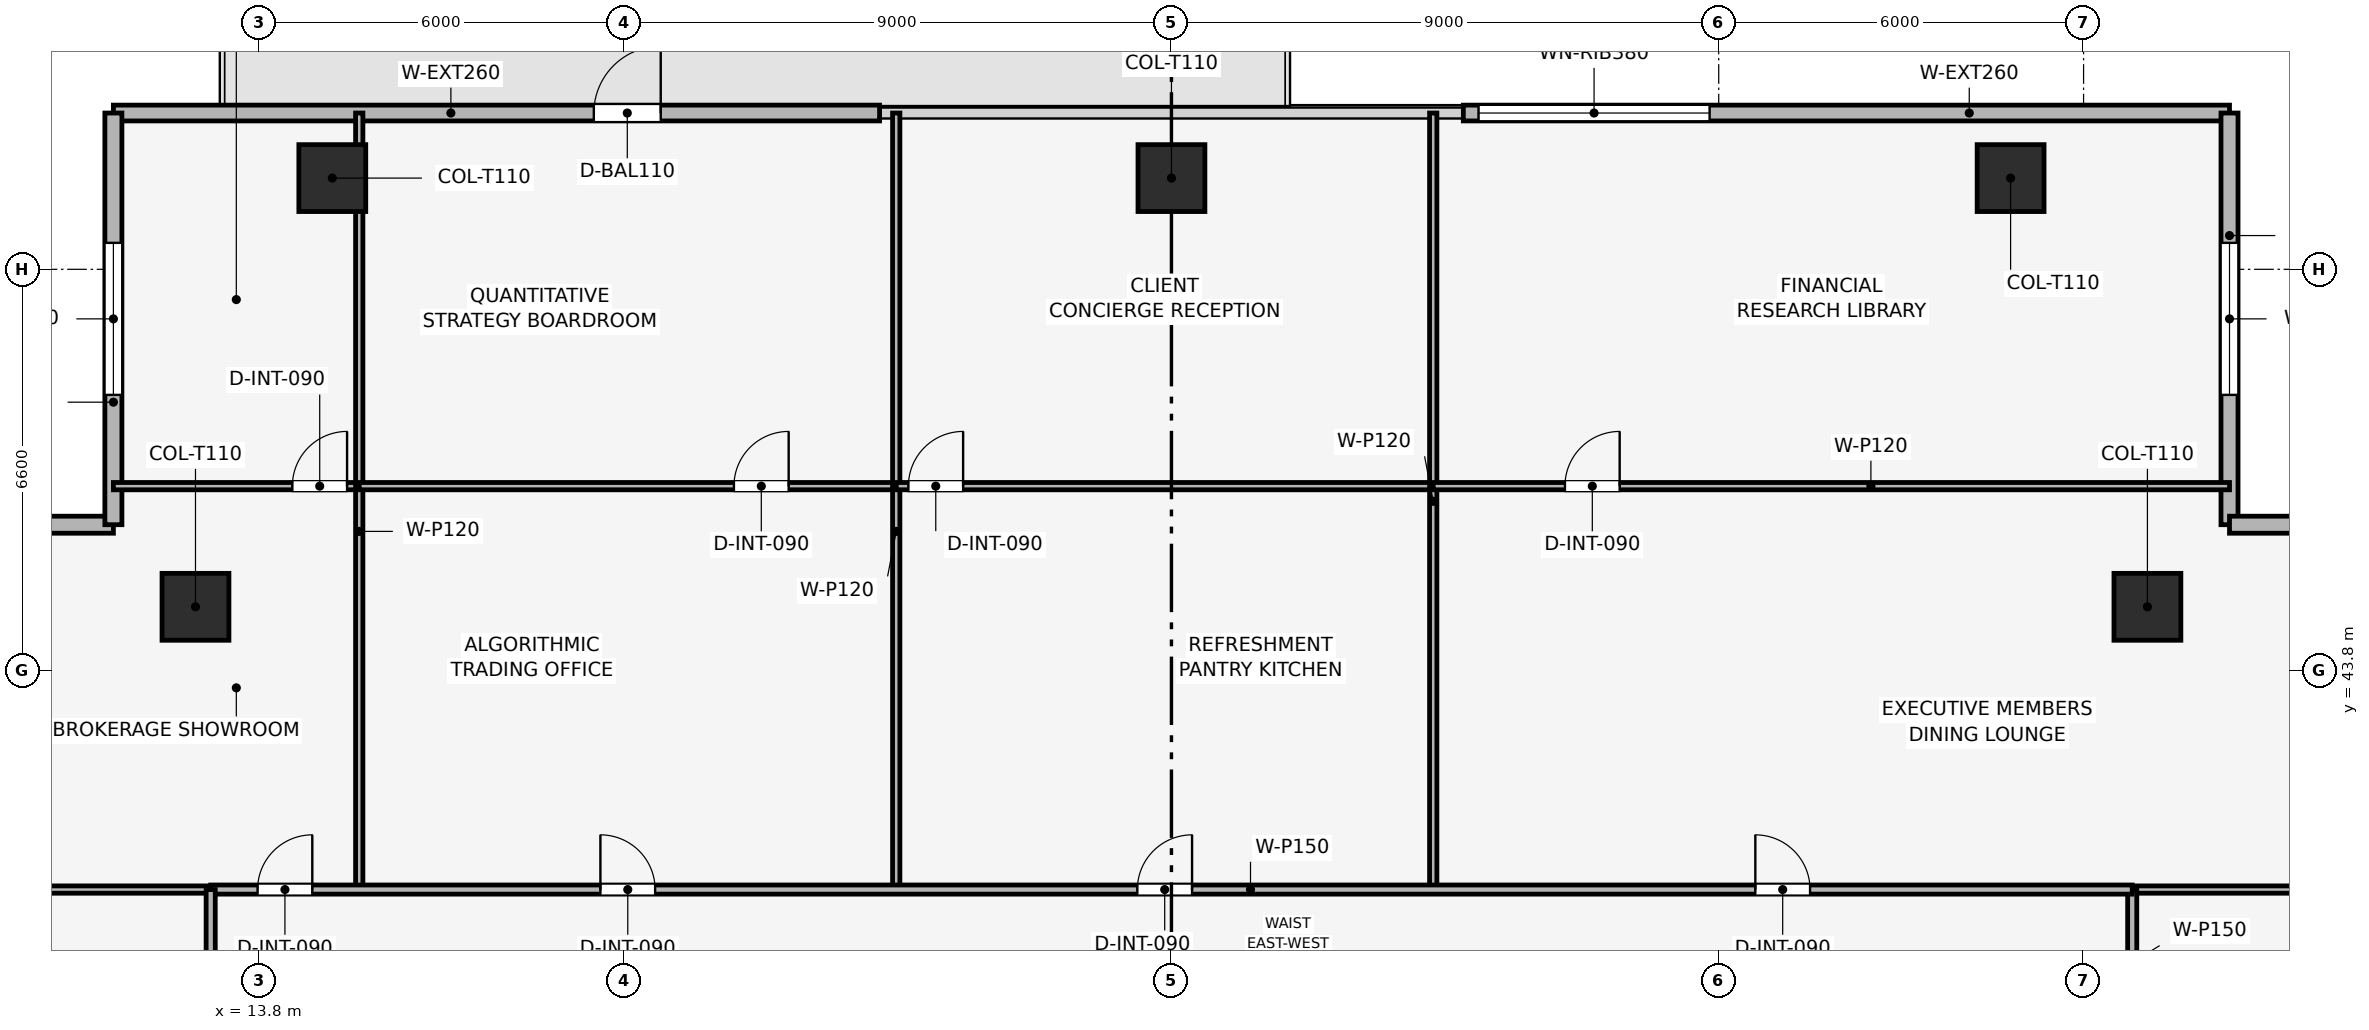
"""IFC4 building model, lengths in metres.
Left out: names, types, materials, properties, quantities, classifications, styles, units other than length and angle.
Written with IfcOpenShell. Run it as: python <this file> out.ifc"""

import sys

from ifc_helpers import new_model, si_unit, direction, frame, frame_2d, origin, origin_2d, place, context, subcontext, project, spatial, rectangle, extrude, element, fill, save


model = new_model("IFC4")
c1 = context("Model", 3, precision=1e-05, world=origin(), true_north=direction((0.0, 1.0)))
c2 = subcontext(c1, "Body", "Model", "MODEL_VIEW")
j1 = project(units=[si_unit("LENGTHUNIT", "METRE"), si_unit("PLANEANGLEUNIT", "RADIAN")], contexts=[c1])
p1 = place(None, origin())
s1 = spatial("IfcSite", under=j1, at=p1, CompositionType="ELEMENT")
p2 = place(p1, origin())
s2 = spatial("IfcBuilding", under=s1, at=p2, CompositionType="ELEMENT")
p3 = place(p2, frame((0.0, 0.0, 145.8)))
s3 = spatial("IfcBuildingStorey", under=s2, at=p3, CompositionType="ELEMENT", Elevation=145.8)
for number, where, z_axis, x_axis in (
    (1, (42.6, 51.9, 0.003), (0.0, 0.0, 1.0), (1.0, 0.0, 0.0)),
    (2, (28.8, 51.9, 0.003), (0.0, 0.0, 1.0), (1.0, 0.0, 0.0)),
    (3, (15.0, 51.9, 0.003), (0.0, 0.0, 1.0), (1.0, 0.0, 0.0)),
    (4, (44.85, 44.85, 0.003), (0.0, 0.0, 1.0), (1.0, 0.0, 0.0)),
    (5, (12.75, 44.85, 0.003), (0.0, 0.0, 1.0), (1.0, 0.0, 0.0)),
):
    element("IfcColumn", number, at=place(p3, frame(where, z_axis=z_axis, x_axis=x_axis)), inside=s3, PredefinedType="COLUMN", context=c2, shape_type="SweptSolid", body=[
        extrude(rectangle(XDim=1.1, YDim=1.1, at=origin_2d()), origin(), (0.0, 0.0, 1.0), 3.489),
    ])
p4 = place(p3, frame((11.4, 52.97, 0.0), z_axis=(0.0, 0.0, 1.0), x_axis=(1.0, 0.0, 0.0)))
e6 = element("IfcWall", 6, at=p4, inside=s3, PredefinedType="SOLIDWALL", context=c2, shape_type="SweptSolid", body=[
    extrude(rectangle(XDim=12.6, YDim=0.26, at=frame_2d((6.3, 0.0))), origin(), (0.0, 0.0, 1.0), 3.495),
])
p5 = place(p4, frame((7.901, 0.0, 0.0)))
e7 = element("IfcOpeningElement", 7, at=p5, cuts=e6, PredefinedType="OPENING", context=c2, shape_type="SweptSolid", body=[
    extrude(rectangle(XDim=1.1, YDim=2.2, at=frame_2d((0.55, 1.1))), frame((0.0, 0.14, 0.0), z_axis=(0.0, -1.0, 0.0), x_axis=(1.0, 0.0, 0.0)), (0.0, 0.0, 1.0), 0.28),
])
p6 = place(p3, frame((33.6, 52.97, 0.0), z_axis=(0.0, 0.0, 1.0), x_axis=(1.0, 0.0, 0.0)))
e8 = element("IfcWall", 8, at=p6, inside=s3, PredefinedType="SOLIDWALL", context=c2, shape_type="SweptSolid", body=[
    extrude(rectangle(XDim=12.6, YDim=0.26, at=frame_2d((6.3, 0.0))), origin(), (0.0, 0.0, 1.0), 3.495),
])
p7 = place(p6, frame((0.25, 0.0, 0.9)))
e9 = element("IfcOpeningElement", 9, at=p7, cuts=e8, PredefinedType="OPENING", context=c2, shape_type="SweptSolid", body=[
    extrude(rectangle(XDim=3.8, YDim=1.9, at=frame_2d((1.9, 0.95))), frame((0.0, 0.14, 0.0), z_axis=(0.0, -1.0, 0.0), x_axis=(1.0, 0.0, 0.0)), (0.0, 0.0, 1.0), 0.28),
])
p8 = place(p3, frame((4.63, 46.2, 0.0), z_axis=(0.0, 0.0, 1.0), x_axis=(1.0, 0.0, 0.0)))
e10 = element("IfcWall", 10, at=p8, inside=s3, PredefinedType="SOLIDWALL", context=c2, shape_type="SweptSolid", body=[
    extrude(rectangle(XDim=6.77, YDim=0.28, at=frame_2d((3.385, 0.0))), origin(), (0.0, 0.0, 1.0), 3.495),
])
p9 = place(p8, frame((2.135, 0.0, 0.9)))
e11 = element("IfcOpeningElement", 11, at=p9, cuts=e10, PredefinedType="OPENING", context=c2, shape_type="SweptSolid", body=[
    extrude(rectangle(XDim=2.5, YDim=1.9, at=frame_2d((1.25, 0.95))), frame((0.0, 0.15, 0.0), z_axis=(0.0, -1.0, 0.0), x_axis=(1.0, 0.0, 0.0)), (0.0, 0.0, 1.0), 0.3),
])
p10 = place(p3, frame((11.4, 46.2, 0.0), z_axis=(0.0, 0.0, 1.0), x_axis=(0.0, 1.0, 0.0)))
e12 = element("IfcWall", 12, at=p10, inside=s3, PredefinedType="SOLIDWALL", context=c2, shape_type="SweptSolid", body=[
    extrude(rectangle(XDim=6.77, YDim=0.28, at=frame_2d((3.385, 0.0))), origin(), (0.0, 0.0, 1.0), 3.495),
])
p11 = place(p10, frame((2.135, 0.0, 0.9)))
e13 = element("IfcOpeningElement", 13, at=p11, cuts=e12, PredefinedType="OPENING", context=c2, shape_type="SweptSolid", body=[
    extrude(rectangle(XDim=2.5, YDim=1.9, at=frame_2d((1.25, 0.95))), frame((0.0, 0.15, 0.0), z_axis=(0.0, -1.0, 0.0), x_axis=(1.0, 0.0, 0.0)), (0.0, 0.0, 1.0), 0.3),
])
p12 = place(p3, frame((46.2, 52.97, 0.0), z_axis=(0.0, 0.0, 1.0), x_axis=(0.0, -1.0, 0.0)))
e14 = element("IfcWall", 14, at=p12, inside=s3, PredefinedType="SOLIDWALL", context=c2, shape_type="SweptSolid", body=[
    extrude(rectangle(XDim=6.77, YDim=0.28, at=frame_2d((3.385, 0.0))), origin(), (0.0, 0.0, 1.0), 3.495),
])
p13 = place(p12, frame((2.135, 0.0, 0.9)))
e15 = element("IfcOpeningElement", 15, at=p13, cuts=e14, PredefinedType="OPENING", context=c2, shape_type="SweptSolid", body=[
    extrude(rectangle(XDim=2.5, YDim=1.9, at=frame_2d((1.25, 0.95))), frame((0.0, 0.15, 0.0), z_axis=(0.0, -1.0, 0.0), x_axis=(1.0, 0.0, 0.0)), (0.0, 0.0, 1.0), 0.3),
])
p14 = place(p3, frame((46.2, 46.2, 0.0), z_axis=(0.0, 0.0, 1.0), x_axis=(1.0, 0.0, 0.0)))
e16 = element("IfcWall", 16, at=p14, inside=s3, PredefinedType="SOLIDWALL", context=c2, shape_type="SweptSolid", body=[
    extrude(rectangle(XDim=6.77, YDim=0.28, at=frame_2d((3.385, 0.0))), origin(), (0.0, 0.0, 1.0), 3.495),
])
p15 = place(p14, frame((2.135, 0.0, 0.9)))
e17 = element("IfcOpeningElement", 17, at=p15, cuts=e16, PredefinedType="OPENING", context=c2, shape_type="SweptSolid", body=[
    extrude(rectangle(XDim=2.5, YDim=1.9, at=frame_2d((1.25, 0.95))), frame((0.0, 0.15, 0.0), z_axis=(0.0, -1.0, 0.0), x_axis=(1.0, 0.0, 0.0)), (0.0, 0.0, 1.0), 0.3),
])
p16 = place(p3, frame((11.4, 46.834, 0.0), z_axis=(0.0, 0.0, 1.0), x_axis=(1.0, 0.0, 0.0)))
e18 = element("IfcWall", 18, at=p16, inside=s3, PredefinedType="PARTITIONING", context=c2, shape_type="SweptSolid", body=[
    extrude(rectangle(XDim=4.043, YDim=0.12, at=frame_2d((2.021, 0.0))), origin(), (0.0, 0.0, 1.0), 2.98),
])
p17 = place(p16, frame((2.943, 0.0, 0.0)))
e19 = element("IfcOpeningElement", 19, at=p17, cuts=e18, PredefinedType="OPENING", context=c2, shape_type="SweptSolid", body=[
    extrude(rectangle(XDim=0.9, YDim=2.1, at=frame_2d((0.45, 1.05))), frame((0.0, 0.07, 0.0), z_axis=(0.0, -1.0, 0.0), x_axis=(1.0, 0.0, 0.0)), (0.0, 0.0, 1.0), 0.14),
])
p18 = place(p3, frame((15.443, 40.2, 0.0), z_axis=(0.0, 0.0, 1.0), x_axis=(0.0, 1.0, 0.0)))
e20 = element("IfcWall", 20, at=p18, inside=s3, PredefinedType="PARTITIONING", context=c2, shape_type="SweptSolid", body=[
    extrude(rectangle(XDim=12.77, YDim=0.12, at=frame_2d((6.385, 0.0))), origin(), (0.0, 0.0, 1.0), 2.98),
])
p19 = place(p3, frame((15.443, 46.834, 0.0), z_axis=(0.0, 0.0, 1.0), x_axis=(1.0, 0.0, 0.0)))
e21 = element("IfcWall", 21, at=p19, inside=s3, PredefinedType="PARTITIONING", context=c2, shape_type="SweptSolid", body=[
    extrude(rectangle(XDim=8.831, YDim=0.12, at=frame_2d((4.416, 0.0))), origin(), (0.0, 0.0, 1.0), 3.03),
])
p20 = place(p19, frame((6.162, 0.0, 0.0)))
e22 = element("IfcOpeningElement", 22, at=p20, cuts=e21, PredefinedType="OPENING", context=c2, shape_type="SweptSolid", body=[
    extrude(rectangle(XDim=0.9, YDim=2.1, at=frame_2d((0.45, 1.05))), frame((0.0, 0.07, 0.0), z_axis=(0.0, -1.0, 0.0), x_axis=(1.0, 0.0, 0.0)), (0.0, 0.0, 1.0), 0.14),
])
p21 = place(p3, frame((24.274, 40.2, 0.0), z_axis=(0.0, 0.0, 1.0), x_axis=(0.0, 1.0, 0.0)))
e23 = element("IfcWall", 23, at=p21, inside=s3, PredefinedType="PARTITIONING", context=c2, shape_type="SweptSolid", body=[
    extrude(rectangle(XDim=12.77, YDim=0.12, at=frame_2d((6.385, 0.0))), origin(), (0.0, 0.0, 1.0), 2.98),
])
p22 = place(p3, frame((24.274, 46.834, 0.0), z_axis=(0.0, 0.0, 1.0), x_axis=(1.0, 0.0, 0.0)))
e24 = element("IfcWall", 24, at=p22, inside=s3, PredefinedType="PARTITIONING", context=c2, shape_type="SweptSolid", body=[
    extrude(rectangle(XDim=8.831, YDim=0.12, at=frame_2d((4.416, 0.0))), origin(), (0.0, 0.0, 1.0), 3.03),
])
p23 = place(p22, frame((0.2, 0.0, 0.0)))
e25 = element("IfcOpeningElement", 25, at=p23, cuts=e24, PredefinedType="OPENING", context=c2, shape_type="SweptSolid", body=[
    extrude(rectangle(XDim=0.9, YDim=2.1, at=frame_2d((0.45, 1.05))), frame((0.0, 0.07, 0.0), z_axis=(0.0, -1.0, 0.0), x_axis=(1.0, 0.0, 0.0)), (0.0, 0.0, 1.0), 0.14),
])
p24 = place(p3, frame((33.105, 40.2, 0.0), z_axis=(0.0, 0.0, 1.0), x_axis=(0.0, 1.0, 0.0)))
e26 = element("IfcWall", 26, at=p24, inside=s3, PredefinedType="PARTITIONING", context=c2, shape_type="SweptSolid", body=[
    extrude(rectangle(XDim=12.77, YDim=0.12, at=frame_2d((6.385, 0.0))), origin(), (0.0, 0.0, 1.0), 2.98),
])
p25 = place(p3, frame((33.105, 46.834, 0.0), z_axis=(0.0, 0.0, 1.0), x_axis=(1.0, 0.0, 0.0)))
e27 = element("IfcWall", 27, at=p25, inside=s3, PredefinedType="PARTITIONING", context=c2, shape_type="SweptSolid", body=[
    extrude(rectangle(XDim=13.095, YDim=0.12, at=frame_2d((6.547, 0.0))), origin(), (0.0, 0.0, 1.0), 2.98),
])
p26 = place(p25, frame((2.166, 0.0, 0.0)))
e28 = element("IfcOpeningElement", 28, at=p26, cuts=e27, PredefinedType="OPENING", context=c2, shape_type="SweptSolid", body=[
    extrude(rectangle(XDim=0.9, YDim=2.1, at=frame_2d((0.45, 1.05))), frame((0.0, 0.07, 0.0), z_axis=(0.0, -1.0, 0.0), x_axis=(1.0, 0.0, 0.0)), (0.0, 0.0, 1.0), 0.14),
])
p27 = place(p3, frame((4.63, 40.2, 0.0), z_axis=(0.0, 0.0, 1.0), x_axis=(1.0, 0.0, 0.0)))
e29 = element("IfcWall", 29, at=p27, inside=s3, PredefinedType="PARTITIONING", context=c2, shape_type="SweptSolid", body=[
    extrude(rectangle(XDim=8.37, YDim=0.12, at=frame_2d((4.185, 0.0))), origin(), (0.0, 0.0, 1.0), 2.98),
])
p28 = place(p3, frame((44.6, 40.2, 0.0), z_axis=(0.0, 0.0, 1.0), x_axis=(1.0, 0.0, 0.0)))
e30 = element("IfcWall", 30, at=p28, inside=s3, PredefinedType="PARTITIONING", context=c2, shape_type="SweptSolid", body=[
    extrude(rectangle(XDim=8.37, YDim=0.12, at=frame_2d((4.185, 0.0))), origin(), (0.0, 0.0, 1.0), 2.98),
])
p29 = place(p3, frame((44.6, 37.8, 0.0), z_axis=(0.0, 0.0, 1.0), x_axis=(0.0, 1.0, 0.0)))
e31 = element("IfcWall", 31, at=p29, inside=s3, PredefinedType="PARTITIONING", context=c2, shape_type="SweptSolid", body=[
    extrude(rectangle(XDim=2.4, YDim=0.15, at=frame_2d((1.2, 0.0))), origin(), (0.0, 0.0, 1.0), 3.495),
])
p30 = place(p3, frame((13.0, 40.2, 0.0), z_axis=(0.0, 0.0, 1.0), x_axis=(1.0, 0.0, 0.0)))
e32 = element("IfcWall", 32, at=p30, inside=s3, PredefinedType="PARTITIONING", context=c2, shape_type="SweptSolid", body=[
    extrude(rectangle(XDim=31.6, YDim=0.15, at=frame_2d((15.8, 0.0))), origin(), (0.0, 0.0, 1.0), 3.03),
])
p31 = place(p30, frame((0.771, 0.0, 0.0)))
e33 = element("IfcOpeningElement", 33, at=p31, cuts=e32, PredefinedType="OPENING", context=c2, shape_type="SweptSolid", body=[
    extrude(rectangle(XDim=0.9, YDim=2.1, at=frame_2d((0.45, 1.05))), frame((0.0, 0.085, 0.0), z_axis=(0.0, -1.0, 0.0), x_axis=(1.0, 0.0, 0.0)), (0.0, 0.0, 1.0), 0.17),
])
p32 = place(p30, frame((6.409, 0.0, 0.0)))
e34 = element("IfcOpeningElement", 34, at=p32, cuts=e32, PredefinedType="OPENING", context=c2, shape_type="SweptSolid", body=[
    extrude(rectangle(XDim=0.9, YDim=2.1, at=frame_2d((0.45, 1.05))), frame((0.0, 0.085, 0.0), z_axis=(0.0, -1.0, 0.0), x_axis=(1.0, 0.0, 0.0)), (0.0, 0.0, 1.0), 0.17),
])
p33 = place(p30, frame((15.239, 0.0, 0.0)))
e35 = element("IfcOpeningElement", 35, at=p33, cuts=e32, PredefinedType="OPENING", context=c2, shape_type="SweptSolid", body=[
    extrude(rectangle(XDim=0.9, YDim=2.1, at=frame_2d((0.45, 1.05))), frame((0.0, 0.085, 0.0), z_axis=(0.0, -1.0, 0.0), x_axis=(1.0, 0.0, 0.0)), (0.0, 0.0, 1.0), 0.17),
])
p34 = place(p30, frame((25.402, 0.0, 0.0)))
e36 = element("IfcOpeningElement", 36, at=p34, cuts=e32, PredefinedType="OPENING", context=c2, shape_type="SweptSolid", body=[
    extrude(rectangle(XDim=0.9, YDim=2.1, at=frame_2d((0.45, 1.05))), frame((0.0, 0.085, 0.0), z_axis=(0.0, -1.0, 0.0), x_axis=(1.0, 0.0, 0.0)), (0.0, 0.0, 1.0), 0.17),
])
p35 = place(p3, frame((13.0, 17.4, 0.0), z_axis=(0.0, 0.0, 1.0), x_axis=(0.0, 1.0, 0.0)))
e37 = element("IfcWall", 37, at=p35, inside=s3, PredefinedType="PARTITIONING", context=c2, shape_type="SweptSolid", body=[
    extrude(rectangle(XDim=22.8, YDim=0.15, at=frame_2d((11.4, 0.0))), origin(), (0.0, 0.0, 1.0), 3.03),
])
p36 = place(p35, frame((6.115, 0.0, 0.0)))
e38 = element("IfcOpeningElement", 38, at=p36, cuts=e37, PredefinedType="OPENING", context=c2, shape_type="SweptSolid", body=[
    extrude(rectangle(XDim=0.9, YDim=2.1, at=frame_2d((0.45, 1.05))), frame((0.0, 0.085, 0.0), z_axis=(0.0, -1.0, 0.0), x_axis=(1.0, 0.0, 0.0)), (0.0, 0.0, 1.0), 0.17),
])
p37 = place(p35, frame((15.115, 0.0, 0.0)))
e39 = element("IfcOpeningElement", 39, at=p37, cuts=e37, PredefinedType="OPENING", context=c2, shape_type="SweptSolid", body=[
    extrude(rectangle(XDim=0.9, YDim=2.1, at=frame_2d((0.45, 1.05))), frame((0.0, 0.085, 0.0), z_axis=(0.0, -1.0, 0.0), x_axis=(1.0, 0.0, 0.0)), (0.0, 0.0, 1.0), 0.17),
])
p38 = place(p5, origin())
e40 = element("IfcDoor", 40, at=p38, inside=s3, OperationType="SINGLE_SWING_RIGHT", PredefinedType="DOOR", context=c2, shape_type="SweptSolid", body=[
    extrude(rectangle(XDim=1.1, YDim=2.2, at=frame_2d((0.55, 1.1))), frame((0.0, 0.025, 0.0), z_axis=(0.0, -1.0, 0.0), x_axis=(1.0, 0.0, 0.0)), (0.0, 0.0, 1.0), 0.05),
])
fill(e7, e40)
p39 = place(p7, origin())
e41 = element("IfcWindow", 41, at=p39, inside=s3, PartitioningType="SINGLE_PANEL", PredefinedType="WINDOW", context=c2, shape_type="SweptSolid", body=[
    extrude(rectangle(XDim=3.8, YDim=1.9, at=frame_2d((1.9, 0.95))), frame((0.0, 0.03, 0.0), z_axis=(0.0, -1.0, 0.0), x_axis=(1.0, 0.0, 0.0)), (0.0, 0.0, 1.0), 0.06),
])
fill(e9, e41)
p40 = place(p11, origin())
e42 = element("IfcWindow", 42, at=p40, inside=s3, PartitioningType="SINGLE_PANEL", PredefinedType="WINDOW", context=c2, shape_type="SweptSolid", body=[
    extrude(rectangle(XDim=2.5, YDim=1.9, at=frame_2d((1.25, 0.95))), frame((0.0, 0.03, 0.0), z_axis=(0.0, -1.0, 0.0), x_axis=(1.0, 0.0, 0.0)), (0.0, 0.0, 1.0), 0.06),
])
fill(e13, e42)
p41 = place(p13, origin())
e43 = element("IfcWindow", 43, at=p41, inside=s3, PartitioningType="SINGLE_PANEL", PredefinedType="WINDOW", context=c2, shape_type="SweptSolid", body=[
    extrude(rectangle(XDim=2.5, YDim=1.9, at=frame_2d((1.25, 0.95))), frame((0.0, 0.03, 0.0), z_axis=(0.0, -1.0, 0.0), x_axis=(1.0, 0.0, 0.0)), (0.0, 0.0, 1.0), 0.06),
])
fill(e15, e43)
p42 = place(p17, origin())
e44 = element("IfcDoor", 44, at=p42, inside=s3, OperationType="SINGLE_SWING_RIGHT", PredefinedType="DOOR", context=c2, shape_type="SweptSolid", body=[
    extrude(rectangle(XDim=0.9, YDim=2.1, at=frame_2d((0.45, 1.05))), frame((0.0, 0.025, 0.0), z_axis=(0.0, -1.0, 0.0), x_axis=(1.0, 0.0, 0.0)), (0.0, 0.0, 1.0), 0.05),
])
fill(e19, e44)
p43 = place(p20, origin())
e45 = element("IfcDoor", 45, at=p43, inside=s3, OperationType="SINGLE_SWING_RIGHT", PredefinedType="DOOR", context=c2, shape_type="SweptSolid", body=[
    extrude(rectangle(XDim=0.9, YDim=2.1, at=frame_2d((0.45, 1.05))), frame((0.0, 0.025, 0.0), z_axis=(0.0, -1.0, 0.0), x_axis=(1.0, 0.0, 0.0)), (0.0, 0.0, 1.0), 0.05),
])
fill(e22, e45)
p44 = place(p23, origin())
e46 = element("IfcDoor", 46, at=p44, inside=s3, OperationType="SINGLE_SWING_RIGHT", PredefinedType="DOOR", context=c2, shape_type="SweptSolid", body=[
    extrude(rectangle(XDim=0.9, YDim=2.1, at=frame_2d((0.45, 1.05))), frame((0.0, 0.025, 0.0), z_axis=(0.0, -1.0, 0.0), x_axis=(1.0, 0.0, 0.0)), (0.0, 0.0, 1.0), 0.05),
])
fill(e25, e46)
p45 = place(p26, origin())
e47 = element("IfcDoor", 47, at=p45, inside=s3, OperationType="SINGLE_SWING_RIGHT", PredefinedType="DOOR", context=c2, shape_type="SweptSolid", body=[
    extrude(rectangle(XDim=0.9, YDim=2.1, at=frame_2d((0.45, 1.05))), frame((0.0, 0.025, 0.0), z_axis=(0.0, -1.0, 0.0), x_axis=(1.0, 0.0, 0.0)), (0.0, 0.0, 1.0), 0.05),
])
fill(e28, e47)
p46 = place(p31, origin())
e48 = element("IfcDoor", 48, at=p46, inside=s3, OperationType="SINGLE_SWING_RIGHT", PredefinedType="DOOR", context=c2, shape_type="SweptSolid", body=[
    extrude(rectangle(XDim=0.9, YDim=2.1, at=frame_2d((0.45, 1.05))), frame((0.0, 0.025, 0.0), z_axis=(0.0, -1.0, 0.0), x_axis=(1.0, 0.0, 0.0)), (0.0, 0.0, 1.0), 0.05),
])
fill(e33, e48)
p47 = place(p32, origin())
e49 = element("IfcDoor", 49, at=p47, inside=s3, OperationType="SINGLE_SWING_LEFT", PredefinedType="DOOR", context=c2, shape_type="SweptSolid", body=[
    extrude(rectangle(XDim=0.9, YDim=2.1, at=frame_2d((0.45, 1.05))), frame((0.0, 0.025, 0.0), z_axis=(0.0, -1.0, 0.0), x_axis=(1.0, 0.0, 0.0)), (0.0, 0.0, 1.0), 0.05),
])
fill(e34, e49)
p48 = place(p33, origin())
e50 = element("IfcDoor", 50, at=p48, inside=s3, OperationType="SINGLE_SWING_RIGHT", PredefinedType="DOOR", context=c2, shape_type="SweptSolid", body=[
    extrude(rectangle(XDim=0.9, YDim=2.1, at=frame_2d((0.45, 1.05))), frame((0.0, 0.025, 0.0), z_axis=(0.0, -1.0, 0.0), x_axis=(1.0, 0.0, 0.0)), (0.0, 0.0, 1.0), 0.05),
])
fill(e35, e50)
p49 = place(p34, origin())
e51 = element("IfcDoor", 51, at=p49, inside=s3, OperationType="SINGLE_SWING_LEFT", PredefinedType="DOOR", context=c2, shape_type="SweptSolid", body=[
    extrude(rectangle(XDim=0.9, YDim=2.1, at=frame_2d((0.45, 1.05))), frame((0.0, 0.025, 0.0), z_axis=(0.0, -1.0, 0.0), x_axis=(1.0, 0.0, 0.0)), (0.0, 0.0, 1.0), 0.05),
])
fill(e36, e51)
save(model, sys.argv[1])
